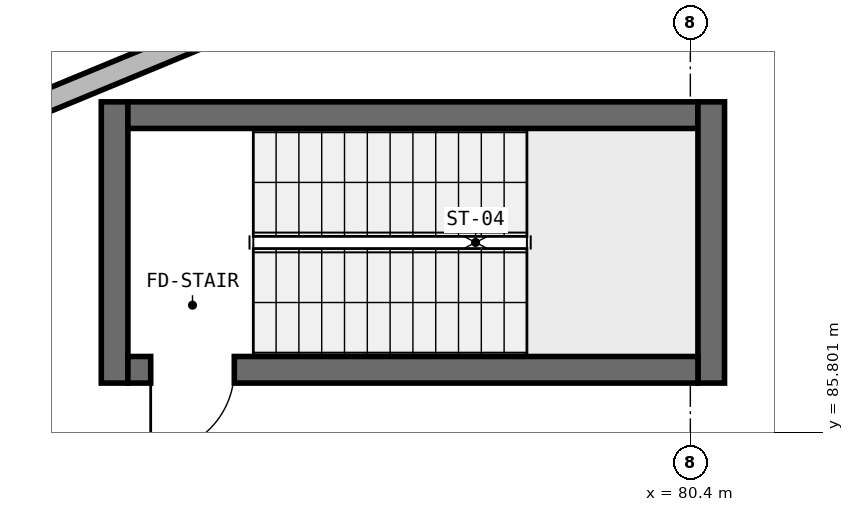
"""IFC4 building model, lengths in metres.
Left out: names, types, materials, properties, quantities, classifications, styles, units other than length and angle.
Written with IfcOpenShell. Run it as: python <this file> out.ifc"""

import sys

from ifc_helpers import new_model, si_unit, direction, frame, frame_2d, origin, place, context, subcontext, project, spatial, rectangle, extrude, element, fill, save


model = new_model("IFC4")
c1 = context("Model", 3, precision=1e-05, world=origin(), true_north=direction((0.0, 1.0)))
c2 = subcontext(c1, "Body", "Model", "MODEL_VIEW")
j1 = project(units=[si_unit("LENGTHUNIT", "METRE"), si_unit("PLANEANGLEUNIT", "RADIAN")], contexts=[c1])
p1 = place(None, origin())
s1 = spatial("IfcSite", under=j1, at=p1, CompositionType="ELEMENT")
p2 = place(p1, origin())
s2 = spatial("IfcBuilding", under=s1, at=p2, CompositionType="ELEMENT")
p3 = place(p2, frame((0.0, 0.0, 9.8)))
s3 = spatial("IfcBuildingStorey", under=s2, at=p3, CompositionType="ELEMENT", Elevation=9.8)
p4 = place(p3, frame((72.825, 86.45, 0.0), z_axis=(0.0, 0.0, 1.0), x_axis=(0.0, 1.0, 0.0)))
e1 = element("IfcWall", 1, at=p4, inside=s3, PredefinedType="SHEAR", context=c2, shape_type="SweptSolid", body=[
    extrude(rectangle(XDim=3.7, YDim=0.35, at=frame_2d((1.85, 0.0))), origin(), (0.0, 0.0, 1.0), 4.55),
])
p5 = place(p3, frame((73.0, 89.975, 0.0), z_axis=(0.0, 0.0, 1.0), x_axis=(1.0, 0.0, 0.0)))
e2 = element("IfcWall", 2, at=p5, inside=s3, PredefinedType="SHEAR", context=c2, shape_type="SweptSolid", body=[
    extrude(rectangle(XDim=7.5, YDim=0.35, at=frame_2d((3.75, 0.0))), origin(), (0.0, 0.0, 1.0), 4.55),
])
p6 = place(p3, frame((80.675, 90.15, 0.0), z_axis=(0.0, 0.0, 1.0), x_axis=(0.0, -1.0, 0.0)))
e3 = element("IfcWall", 3, at=p6, inside=s3, PredefinedType="SHEAR", context=c2, shape_type="SweptSolid", body=[
    extrude(rectangle(XDim=3.7, YDim=0.35, at=frame_2d((1.85, 0.0))), origin(), (0.0, 0.0, 1.0), 4.55),
])
p7 = place(p3, frame((80.5, 86.625, 0.0), z_axis=(0.0, 0.0, 1.0), x_axis=(-1.0, 0.0, 0.0)))
e4 = element("IfcWall", 4, at=p7, inside=s3, PredefinedType="SHEAR", context=c2, shape_type="SweptSolid", body=[
    extrude(rectangle(XDim=7.5, YDim=0.35, at=frame_2d((3.75, 0.0))), origin(), (0.0, 0.0, 1.0), 4.55),
])
p8 = place(p7, frame((6.1, 0.0, 0.0)))
e5 = element("IfcOpeningElement", 5, at=p8, cuts=e4, PredefinedType="OPENING", context=c2, shape_type="SweptSolid", body=[
    extrude(rectangle(XDim=1.1, YDim=2.15, at=frame_2d((0.55, 1.075))), frame((0.0, 0.185, 0.0), z_axis=(0.0, -1.0, 0.0), x_axis=(1.0, 0.0, 0.0)), (0.0, 0.0, 1.0), 0.37),
])
p9 = place(p3, frame((76.988, 93.341, 0.0), z_axis=(0.0, 0.0, 1.0), x_axis=(-0.92385889973, -0.382733240508, 0.0)))
e6 = element("IfcWall", 6, at=p9, inside=s3, PredefinedType="SOLIDWALL", context=c2, shape_type="SweptSolid", body=[
    extrude(rectangle(XDim=10.081, YDim=0.29, at=frame_2d((5.04, 0.0))), origin(), (0.0, 0.0, 1.0), 4.37),
])
p10 = place(p9, frame((3.8, 0.0, 0.95)))
e7 = element("IfcOpeningElement", 7, at=p10, cuts=e6, PredefinedType="OPENING", context=c2, shape_type="SweptSolid", body=[
    extrude(rectangle(XDim=2.48, YDim=1.35, at=frame_2d((1.24, 0.675))), frame((0.0, 0.155, 0.0), z_axis=(0.0, -1.0, 0.0), x_axis=(1.0, 0.0, 0.0)), (0.0, 0.0, 1.0), 0.31),
])
p11 = place(p3, frame((68.179, 88.607, 0.0), z_axis=(0.0, 0.0, 1.0), x_axis=(0.923848052238, 0.382759423628, 0.0)))
e8 = element("IfcWall", 8, at=p11, inside=s3, PredefinedType="SOLIDWALL", context=c2, shape_type="SweptSolid", body=[
    extrude(rectangle(XDim=9.821, YDim=0.29, at=frame_2d((4.91, 0.0))), origin(), (0.0, 0.0, 1.0), 4.37),
])
p12 = place(p11, frame((1.765, 0.0, 0.95)))
e9 = element("IfcOpeningElement", 9, at=p12, cuts=e8, PredefinedType="OPENING", context=c2, shape_type="SweptSolid", body=[
    extrude(rectangle(XDim=1.38, YDim=1.72, at=frame_2d((0.69, 0.86))), frame((0.0, 0.155, 0.0), z_axis=(0.0, -1.0, 0.0), x_axis=(1.0, 0.0, 0.0)), (0.0, 0.0, 1.0), 0.31),
])
p13 = place(p11, frame((6.676, 0.0, 0.95)))
e10 = element("IfcOpeningElement", 10, at=p13, cuts=e8, PredefinedType="OPENING", context=c2, shape_type="SweptSolid", body=[
    extrude(rectangle(XDim=1.38, YDim=1.72, at=frame_2d((0.69, 0.86))), frame((0.0, 0.155, 0.0), z_axis=(0.0, -1.0, 0.0), x_axis=(1.0, 0.0, 0.0)), (0.0, 0.0, 1.0), 0.31),
])
p14 = place(p8, origin())
e11 = element("IfcDoor", 11, at=p14, inside=s3, OperationType="SINGLE_SWING_RIGHT", PredefinedType="DOOR", context=c2, shape_type="SweptSolid", body=[
    extrude(rectangle(XDim=1.1, YDim=2.15, at=frame_2d((0.55, 1.075))), frame((0.0, 0.025, 0.0), z_axis=(0.0, -1.0, 0.0), x_axis=(1.0, 0.0, 0.0)), (0.0, 0.0, 1.0), 0.05),
])
fill(e5, e11)
save(model, sys.argv[1])
